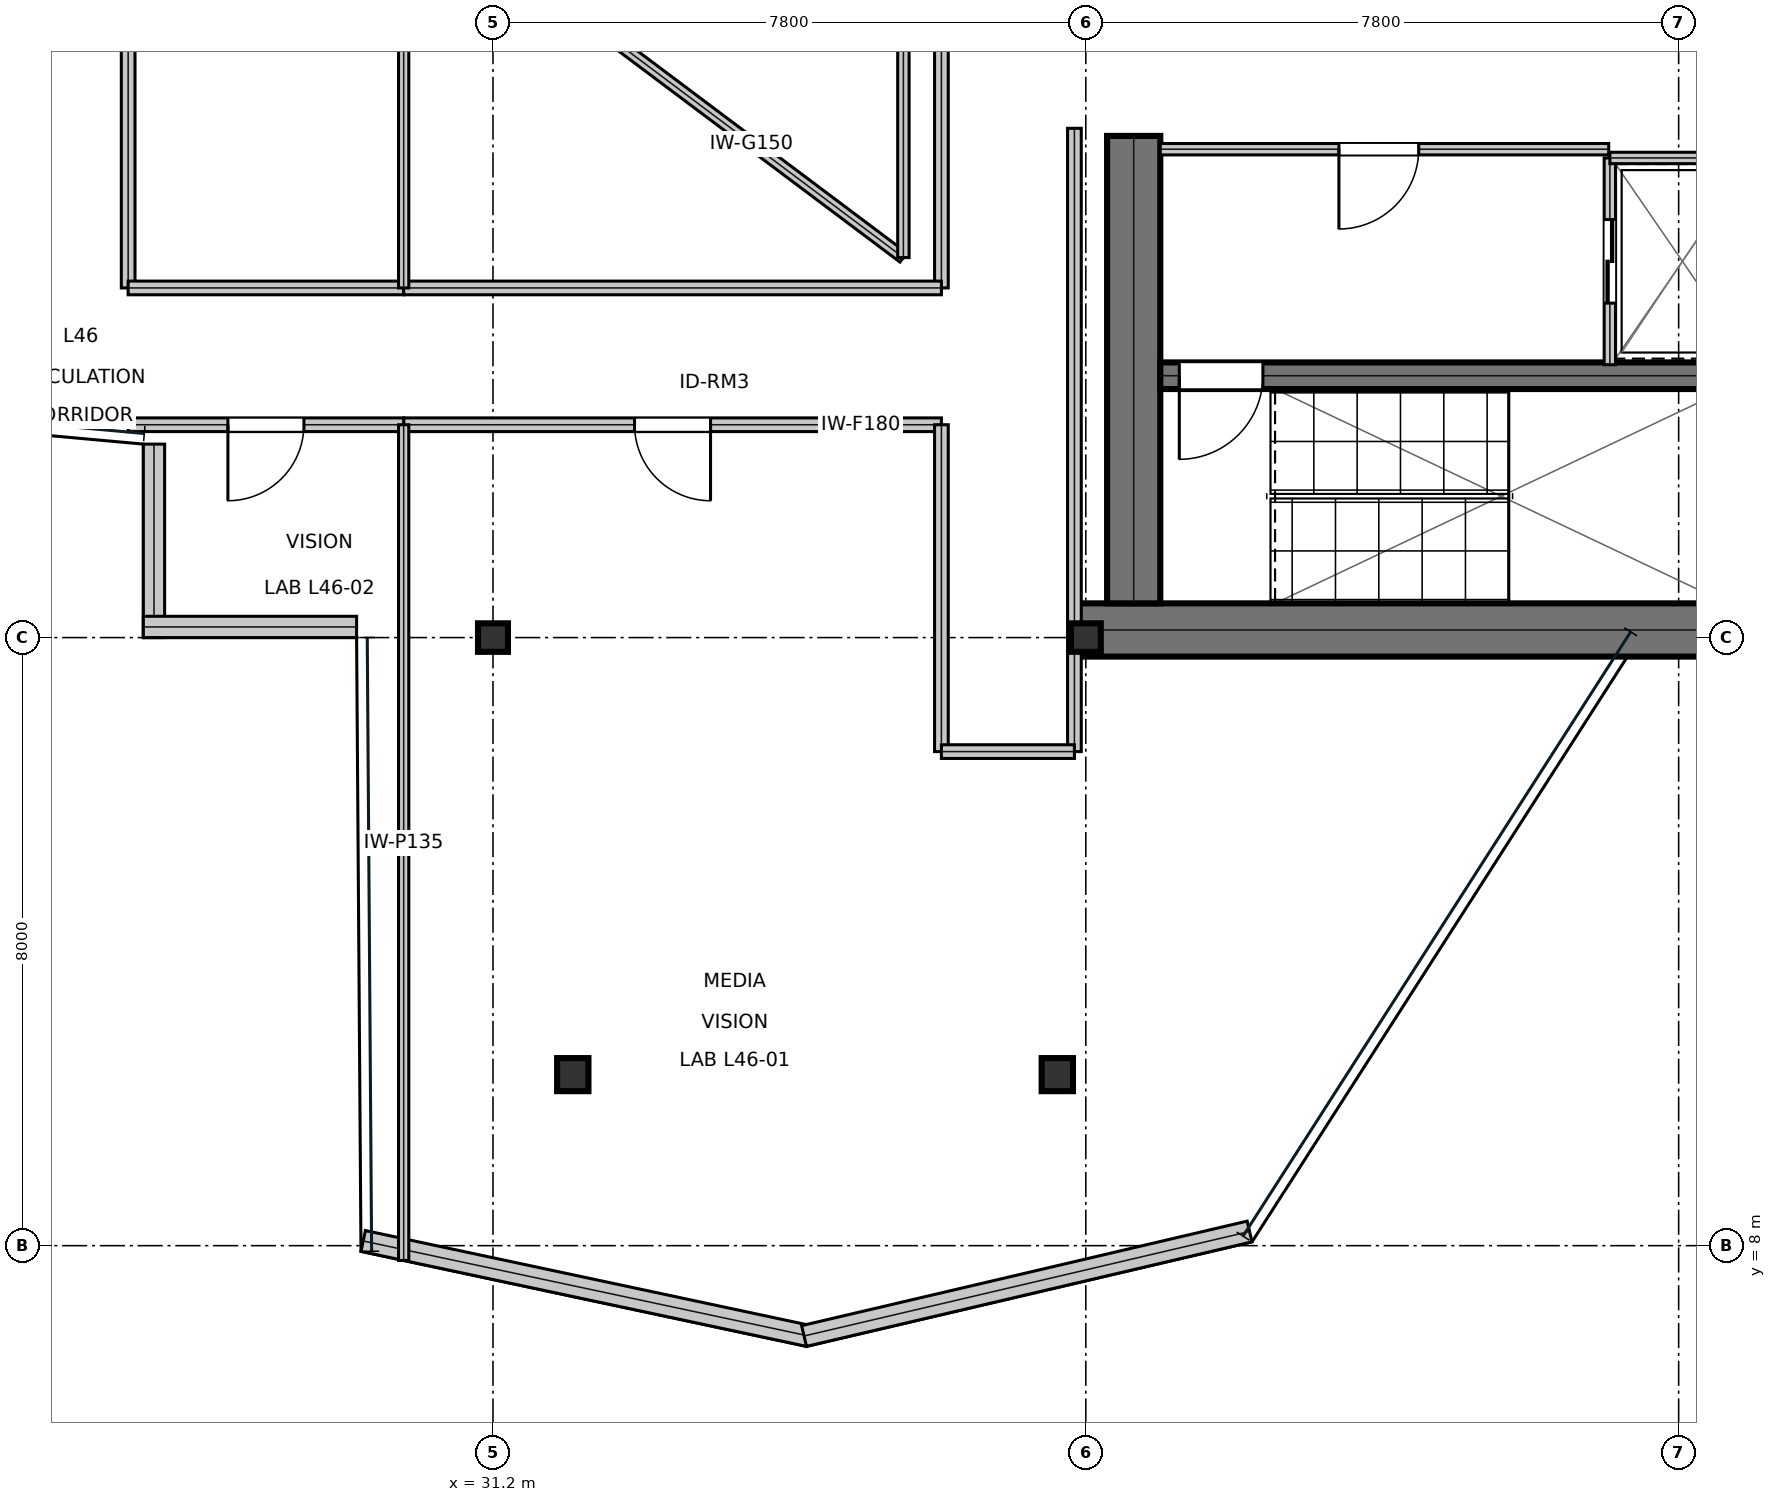
"""IFC4 building model, lengths in metres.
Left out: names, types, materials, properties, quantities, classifications, styles, units other than length and angle.
Written with IfcOpenShell. Run it as: python <this file> out.ifc"""

import sys

from ifc_helpers import new_model, si_unit, direction, frame, frame_2d, origin, origin_2d, place, context, subcontext, project, spatial, rectangle, i_section, extrude, element, fill, save


model = new_model("IFC4")
c1 = context("Model", 3, precision=1e-05, world=origin(), true_north=direction((0.0, 1.0)))
c2 = subcontext(c1, "Body", "Model", "MODEL_VIEW")
j1 = project(units=[si_unit("LENGTHUNIT", "METRE"), si_unit("PLANEANGLEUNIT", "RADIAN")], contexts=[c1])
p1 = place(None, origin())
s1 = spatial("IfcSite", under=j1, at=p1, CompositionType="ELEMENT")
p2 = place(p1, origin())
s2 = spatial("IfcBuilding", under=s1, at=p2, CompositionType="ELEMENT")
p3 = place(p2, frame((0.0, 0.0, 199.95)))
s3 = spatial("IfcBuildingStorey", under=s2, at=p3, CompositionType="ELEMENT", Elevation=199.95)
p4 = place(p3, frame((38.8, 16.1, 0.0), z_axis=(0.0, 0.0, 1.0), x_axis=(1.0, 0.0, 0.0)))
e1 = element("IfcWall", 1, at=p4, inside=s3, PredefinedType="SHEAR", context=c2, shape_type="SweptSolid", body=[
    extrude(rectangle(XDim=16.0, YDim=0.7, at=frame_2d((8.0, 0.0))), origin(), (0.0, 0.0, 1.0), 3.79),
])
p5 = place(p3, frame((39.63, 16.45, 0.0), z_axis=(0.0, 0.0, 1.0), x_axis=(0.0, 1.0, 0.0)))
e2 = element("IfcWall", 2, at=p5, inside=s3, PredefinedType="SHEAR", context=c2, shape_type="SweptSolid", body=[
    extrude(rectangle(XDim=6.15, YDim=0.7, at=frame_2d((3.075, 0.0))), origin(), (0.0, 0.0, 1.0), 3.79),
])
p6 = place(p3, frame((39.98, 19.445, 0.0), z_axis=(0.0, 0.0, 1.0), x_axis=(1.0, 0.0, 0.0)))
e3 = element("IfcWall", 3, at=p6, inside=s3, PredefinedType="SHEAR", context=c2, shape_type="SweptSolid", body=[
    extrude(rectangle(XDim=7.71, YDim=0.35, at=frame_2d((3.855, 0.0))), origin(), (0.0, 0.0, 1.0), 3.79),
])
p7 = place(p6, frame((0.25, 0.0, 0.0)))
e4 = element("IfcOpeningElement", 4, at=p7, cuts=e3, PredefinedType="OPENING", context=c2, shape_type="SweptSolid", body=[
    extrude(rectangle(XDim=1.1, YDim=2.15, at=frame_2d((0.55, 1.075))), frame((0.0, 0.185, 0.0), z_axis=(0.0, -1.0, 0.0), x_axis=(1.0, 0.0, 0.0)), (0.0, 0.0, 1.0), 0.37),
])
for number, where, z_axis, x_axis in (
    (5, (31.2, 16.0, 0.0), (0.0, 0.0, 1.0), (1.0, 0.0, 0.0)),
    (6, (39.0, 16.0, 0.0), (0.0, 0.0, 1.0), (1.0, 0.0, 0.0)),
):
    element("IfcColumn", number, at=place(p3, frame(where, z_axis=z_axis, x_axis=x_axis)), inside=s3, PredefinedType="COLUMN", context=c2, shape_type="SweptSolid", body=[
        extrude(i_section(OverallWidth=0.394, OverallDepth=0.375, WebThickness=0.017, FlangeThickness=0.028, at=origin_2d()), origin(), (0.0, 0.0, 1.0), 4.044),
    ])
p8 = place(p3, frame((32.25, 10.25, 0.016), z_axis=(0.017424616635, 0.037277751269, 0.999153017308), x_axis=(-0.905919107853, 0.423450788199, 0.0)))
e7 = element("IfcColumn", 7, at=p8, inside=s3, PredefinedType="COLUMN", context=c2, shape_type="SweptSolid", body=[
    extrude(i_section(OverallWidth=0.412, OverallDepth=0.435, WebThickness=0.036, FlangeThickness=0.058, at=origin_2d()), origin(), (0.0, 0.0, 1.0), 4.021),
])
p9 = place(p3, frame((38.625, 10.25, 0.016), z_axis=(-0.006193542422, 0.03728269654, 0.999285565077), x_axis=(-0.986480631929, -0.163877889995, 0.0)))
e8 = element("IfcColumn", 8, at=p9, inside=s3, PredefinedType="COLUMN", context=c2, shape_type="SweptSolid", body=[
    extrude(i_section(OverallWidth=0.412, OverallDepth=0.435, WebThickness=0.036, FlangeThickness=0.058, at=origin_2d()), origin(), (0.0, 0.0, 1.0), 4.021),
])
p10 = place(p3, frame((26.74, 18.545, 0.0), z_axis=(0.0, 0.0, 1.0), x_axis=(0.0, -1.0, 0.0)))
e9 = element("IfcWall", 9, at=p10, inside=s3, PredefinedType="STANDARD", context=c2, shape_type="SweptSolid", body=[
    extrude(rectangle(XDim=2.545, YDim=0.28, at=frame_2d((1.273, 0.0))), origin(), (0.0, 0.0, 1.0), 3.319),
])
p11 = place(p3, frame((26.6, 16.14, 0.0), z_axis=(0.0, 0.0, 1.0), x_axis=(1.0, 0.0, 0.0)))
e10 = element("IfcWall", 10, at=p11, inside=s3, PredefinedType="STANDARD", context=c2, shape_type="SweptSolid", body=[
    extrude(rectangle(XDim=2.806, YDim=0.28, at=frame_2d((1.403, 0.0))), origin(), (0.0, 0.0, 1.0), 3.79),
])
p12 = place(p3, frame((29.492, 8.062, 0.0), z_axis=(0.0, 0.0, 1.0), x_axis=(0.978010564176, -0.208555355626, 0.0)))
e11 = element("IfcWall", 11, at=p12, inside=s3, PredefinedType="STANDARD", context=c2, shape_type="SweptSolid", body=[
    extrude(rectangle(XDim=5.994, YDim=0.28, at=frame_2d((2.997, 0.0))), origin(), (0.0, 0.0, 1.0), 3.79),
])
p13 = place(p3, frame((35.293, 6.811, 0.0), z_axis=(0.0, 0.0, 1.0), x_axis=(0.973574347184, 0.228370292517, 0.0)))
e12 = element("IfcWall", 12, at=p13, inside=s3, PredefinedType="STANDARD", context=c2, shape_type="SweptSolid", body=[
    extrude(rectangle(XDim=6.021, YDim=0.28, at=frame_2d((3.01, 0.0))), origin(), (0.0, 0.0, 1.0), 3.79),
])
p14 = place(p3, frame((39.98, 22.425, 0.0), z_axis=(0.0, 0.0, 1.0), x_axis=(1.0, 0.0, 0.0)))
e13 = element("IfcWall", 13, at=p14, inside=s3, PredefinedType="PARTITIONING", context=c2, shape_type="SweptSolid", body=[
    extrude(rectangle(XDim=5.9, YDim=0.15, at=frame_2d((2.95, 0.0))), origin(), (0.0, 0.0, 1.0), 3.79),
])
p15 = place(p14, frame((2.35, 0.0, 0.0)))
e14 = element("IfcOpeningElement", 14, at=p15, cuts=e13, PredefinedType="OPENING", context=c2, shape_type="SweptSolid", body=[
    extrude(rectangle(XDim=1.05, YDim=2.15, at=frame_2d((0.525, 1.075))), frame((0.0, 0.085, 0.0), z_axis=(0.0, -1.0, 0.0), x_axis=(1.0, 0.0, 0.0)), (0.0, 0.0, 1.0), 0.17),
])
p16 = place(p3, frame((45.895, 19.59, 0.0), z_axis=(0.0, 0.0, 1.0), x_axis=(0.0, 1.0, 0.0)))
e15 = element("IfcWall", 15, at=p16, inside=s3, PredefinedType="PARTITIONING", context=c2, shape_type="SweptSolid", body=[
    extrude(rectangle(XDim=2.72, YDim=0.15, at=frame_2d((1.36, 0.0))), origin(), (0.0, 0.0, 1.0), 3.79),
])
p17 = place(p16, frame((0.81, 0.0, 0.0)))
e16 = element("IfcOpeningElement", 16, at=p17, cuts=e15, PredefinedType="OPENING", context=c2, shape_type="SweptSolid", body=[
    extrude(rectangle(XDim=1.1, YDim=2.15, at=frame_2d((0.55, 1.075))), frame((0.0, 0.085, 0.0), z_axis=(0.0, -1.0, 0.0), x_axis=(1.0, 0.0, 0.0)), (0.0, 0.0, 1.0), 0.17),
])
p18 = place(p3, frame((45.895, 22.31, 0.0), z_axis=(0.0, 0.0, 1.0), x_axis=(1.0, 0.0, 0.0)))
e17 = element("IfcWall", 17, at=p18, inside=s3, PredefinedType="PARTITIONING", context=c2, shape_type="SweptSolid", body=[
    extrude(rectangle(XDim=1.915, YDim=0.15, at=frame_2d((0.958, 0.0))), origin(), (0.0, 0.0, 1.0), 3.79),
])
p19 = place(p3, frame((30.025, 18.8, 0.0), z_axis=(0.0, 0.0, 1.0), x_axis=(1.0, 0.0, 0.0)))
e18 = element("IfcWall", 18, at=p19, inside=s3, PredefinedType="SOLIDWALL", context=c2, shape_type="SweptSolid", body=[
    extrude(rectangle(XDim=7.075, YDim=0.18, at=frame_2d((3.538, 0.0))), origin(), (0.0, 0.0, 1.0), 3.241),
])
p20 = place(p19, frame((3.038, 0.0, 0.0)))
e19 = element("IfcOpeningElement", 19, at=p20, cuts=e18, PredefinedType="OPENING", context=c2, shape_type="SweptSolid", body=[
    extrude(rectangle(XDim=1.0, YDim=2.15, at=frame_2d((0.5, 1.075))), frame((0.0, 0.1, 0.0), z_axis=(0.0, -1.0, 0.0), x_axis=(1.0, 0.0, 0.0)), (0.0, 0.0, 1.0), 0.2),
])
p21 = place(p3, frame((26.4, 18.8, 0.0), z_axis=(0.0, 0.0, 1.0), x_axis=(1.0, 0.0, 0.0)))
e20 = element("IfcWall", 20, at=p21, inside=s3, PredefinedType="SOLIDWALL", context=c2, shape_type="SweptSolid", body=[
    extrude(rectangle(XDim=3.625, YDim=0.18, at=frame_2d((1.812, 0.0))), origin(), (0.0, 0.0, 1.0), 3.79),
])
p22 = place(p21, frame((1.312, 0.0, 0.0)))
e21 = element("IfcOpeningElement", 21, at=p22, cuts=e20, PredefinedType="OPENING", context=c2, shape_type="SweptSolid", body=[
    extrude(rectangle(XDim=1.0, YDim=2.15, at=frame_2d((0.5, 1.075))), frame((0.0, 0.1, 0.0), z_axis=(0.0, -1.0, 0.0), x_axis=(1.0, 0.0, 0.0)), (0.0, 0.0, 1.0), 0.2),
])
p23 = place(p3, frame((26.4, 20.6, 0.0), z_axis=(0.0, 0.0, 1.0), x_axis=(0.0, 1.0, 0.0)))
e22 = element("IfcWall", 22, at=p23, inside=s3, PredefinedType="SOLIDWALL", context=c2, shape_type="SweptSolid", body=[
    extrude(rectangle(XDim=8.836, YDim=0.18, at=frame_2d((4.418, 0.0))), origin(), (0.0, 0.0, 1.0), 3.241),
])
p24 = place(p23, frame((3.918, 0.0, 0.0)))
e23 = element("IfcOpeningElement", 23, at=p24, cuts=e22, PredefinedType="OPENING", context=c2, shape_type="SweptSolid", body=[
    extrude(rectangle(XDim=1.0, YDim=2.15, at=frame_2d((0.5, 1.075))), frame((0.0, 0.1, 0.0), z_axis=(0.0, -1.0, 0.0), x_axis=(1.0, 0.0, 0.0)), (0.0, 0.0, 1.0), 0.2),
])
p25 = place(p3, frame((37.1, 20.6, 0.0), z_axis=(0.0, 0.0, 1.0), x_axis=(0.0, 1.0, 0.0)))
e24 = element("IfcWall", 24, at=p25, inside=s3, PredefinedType="SOLIDWALL", context=c2, shape_type="SweptSolid", body=[
    extrude(rectangle(XDim=12.9, YDim=0.18, at=frame_2d((6.45, 0.0))), origin(), (0.0, 0.0, 1.0), 3.241),
])
p26 = place(p25, frame((7.39, 0.0, 0.0)))
e25 = element("IfcOpeningElement", 25, at=p26, cuts=e24, PredefinedType="OPENING", context=c2, shape_type="SweptSolid", body=[
    extrude(rectangle(XDim=1.0, YDim=2.15, at=frame_2d((0.5, 1.075))), frame((0.0, 0.1, 0.0), z_axis=(0.0, -1.0, 0.0), x_axis=(1.0, 0.0, 0.0)), (0.0, 0.0, 1.0), 0.2),
])
p27 = place(p3, frame((38.85, 14.5, 0.0), z_axis=(0.0, 0.0, 1.0), x_axis=(0.0, 1.0, 0.0)))
e26 = element("IfcWall", 26, at=p27, inside=s3, PredefinedType="SOLIDWALL", context=c2, shape_type="SweptSolid", body=[
    extrude(rectangle(XDim=8.2, YDim=0.18, at=frame_2d((4.1, 0.0))), origin(), (0.0, 0.0, 1.0), 3.241),
])
p28 = place(p3, frame((37.1, 14.5, 0.0), z_axis=(0.0, 0.0, 1.0), x_axis=(0.0, 1.0, 0.0)))
e27 = element("IfcWall", 27, at=p28, inside=s3, PredefinedType="SOLIDWALL", context=c2, shape_type="SweptSolid", body=[
    extrude(rectangle(XDim=4.3, YDim=0.18, at=frame_2d((2.15, 0.0))), origin(), (0.0, 0.0, 1.0), 3.241),
])
p29 = place(p3, frame((37.1, 14.5, 0.0), z_axis=(0.0, 0.0, 1.0), x_axis=(1.0, 0.0, 0.0)))
e28 = element("IfcWall", 28, at=p29, inside=s3, PredefinedType="SOLIDWALL", context=c2, shape_type="SweptSolid", body=[
    extrude(rectangle(XDim=1.75, YDim=0.18, at=frame_2d((0.875, 0.0))), origin(), (0.0, 0.0, 1.0), 3.241),
])
p30 = place(p3, frame((26.4, 20.6, 0.0), z_axis=(0.0, 0.0, 1.0), x_axis=(1.0, 0.0, 0.0)))
e29 = element("IfcWall", 29, at=p30, inside=s3, PredefinedType="SOLIDWALL", context=c2, shape_type="SweptSolid", body=[
    extrude(rectangle(XDim=3.625, YDim=0.18, at=frame_2d((1.812, 0.0))), origin(), (0.0, 0.0, 1.0), 3.79),
])
p31 = place(p3, frame((30.025, 20.6, 0.0), z_axis=(0.0, 0.0, 1.0), x_axis=(1.0, 0.0, 0.0)))
e30 = element("IfcWall", 30, at=p31, inside=s3, PredefinedType="SOLIDWALL", context=c2, shape_type="SweptSolid", body=[
    extrude(rectangle(XDim=7.075, YDim=0.18, at=frame_2d((3.538, 0.0))), origin(), (0.0, 0.0, 1.0), 3.241),
])
p32 = place(p3, frame((30.025, 7.805, 0.0), z_axis=(0.0, 0.0, 1.0), x_axis=(0.0, 1.0, 0.0)))
e31 = element("IfcWall", 31, at=p32, inside=s3, PredefinedType="PARTITIONING", context=c2, shape_type="SweptSolid", body=[
    extrude(rectangle(XDim=10.995, YDim=0.135, at=frame_2d((5.498, 0.0))), origin(), (0.0, 0.0, 1.0), 3.319),
])
p33 = place(p3, frame((30.025, 20.6, 0.0), z_axis=(0.0, 0.0, 1.0), x_axis=(0.0, 1.0, 0.0)))
e32 = element("IfcWall", 32, at=p33, inside=s3, PredefinedType="PARTITIONING", context=c2, shape_type="SweptSolid", body=[
    extrude(rectangle(XDim=19.595, YDim=0.135, at=frame_2d((9.797, 0.0))), origin(), (0.0, 0.0, 1.0), 3.241),
])
p34 = place(p3, frame((32.6, 24.0, 0.0), z_axis=(0.0, 0.0, 1.0), x_axis=(0.8, -0.6, 0.0)))
e33 = element("IfcWall", 33, at=p34, inside=s3, PredefinedType="MOVABLE", context=c2, shape_type="SweptSolid", body=[
    extrude(rectangle(XDim=5.0, YDim=0.15, at=frame_2d((2.5, 0.0))), origin(), (0.0, 0.0, 1.0), 3.79),
])
p35 = place(p3, frame((36.6, 21.0, 0.0), z_axis=(0.0, 0.0, 1.0), x_axis=(0.0, 1.0, 0.0)))
e34 = element("IfcWall", 34, at=p35, inside=s3, PredefinedType="MOVABLE", context=c2, shape_type="SweptSolid", body=[
    extrude(rectangle(XDim=6.0, YDim=0.15, at=frame_2d((3.0, 0.0))), origin(), (0.0, 0.0, 1.0), 3.79),
])
p36 = place(p15, frame((1.05, 0.0, 0.0), z_axis=(0.0, 0.0, 1.0), x_axis=(-1.0, 0.0, 0.0)))
e35 = element("IfcDoor", 35, at=p36, inside=s3, OperationType="SINGLE_SWING_RIGHT", PredefinedType="DOOR", context=c2, shape_type="SweptSolid", body=[
    extrude(rectangle(XDim=1.05, YDim=2.15, at=frame_2d((0.525, 1.075))), frame((0.0, 0.025, 0.0), z_axis=(0.0, -1.0, 0.0), x_axis=(1.0, 0.0, 0.0)), (0.0, 0.0, 1.0), 0.05),
])
fill(e14, e35)
p37 = place(p17, frame((1.1, 0.0, 0.0), z_axis=(0.0, 0.0, 1.0), x_axis=(-1.0, 0.0, 0.0)))
e36 = element("IfcDoor", 36, at=p37, inside=s3, OperationType="DOUBLE_DOOR_SLIDING", PredefinedType="DOOR", context=c2, shape_type="SweptSolid", body=[
    extrude(rectangle(XDim=1.1, YDim=2.15, at=frame_2d((0.55, 1.075))), frame((0.0, 0.025, 0.0), z_axis=(0.0, -1.0, 0.0), x_axis=(1.0, 0.0, 0.0)), (0.0, 0.0, 1.0), 0.05),
])
fill(e16, e36)
p38 = place(p20, frame((1.0, 0.0, 0.0), z_axis=(0.0, 0.0, 1.0), x_axis=(-1.0, 0.0, 0.0)))
e37 = element("IfcDoor", 37, at=p38, inside=s3, OperationType="SINGLE_SWING_LEFT", PredefinedType="DOOR", context=c2, shape_type="SweptSolid", body=[
    extrude(rectangle(XDim=1.0, YDim=2.15, at=frame_2d((0.5, 1.075))), frame((0.0, 0.025, 0.0), z_axis=(0.0, -1.0, 0.0), x_axis=(1.0, 0.0, 0.0)), (0.0, 0.0, 1.0), 0.05),
])
fill(e19, e37)
p39 = place(p22, frame((1.0, 0.0, 0.0), z_axis=(0.0, 0.0, 1.0), x_axis=(-1.0, 0.0, 0.0)))
e38 = element("IfcDoor", 38, at=p39, inside=s3, OperationType="SINGLE_SWING_RIGHT", PredefinedType="DOOR", context=c2, shape_type="SweptSolid", body=[
    extrude(rectangle(XDim=1.0, YDim=2.15, at=frame_2d((0.5, 1.075))), frame((0.0, 0.025, 0.0), z_axis=(0.0, -1.0, 0.0), x_axis=(1.0, 0.0, 0.0)), (0.0, 0.0, 1.0), 0.05),
])
fill(e21, e38)
p40 = place(p7, frame((1.1, 0.0, 0.0), z_axis=(0.0, 0.0, 1.0), x_axis=(-1.0, 0.0, 0.0)))
e39 = element("IfcDoor", 39, at=p40, inside=s3, OperationType="SINGLE_SWING_RIGHT", PredefinedType="DOOR", context=c2, shape_type="SweptSolid", body=[
    extrude(rectangle(XDim=1.1, YDim=2.15, at=frame_2d((0.55, 1.075))), frame((0.0, 0.025, 0.0), z_axis=(0.0, -1.0, 0.0), x_axis=(1.0, 0.0, 0.0)), (0.0, 0.0, 1.0), 0.05),
])
fill(e4, e39)
save(model, sys.argv[1])
